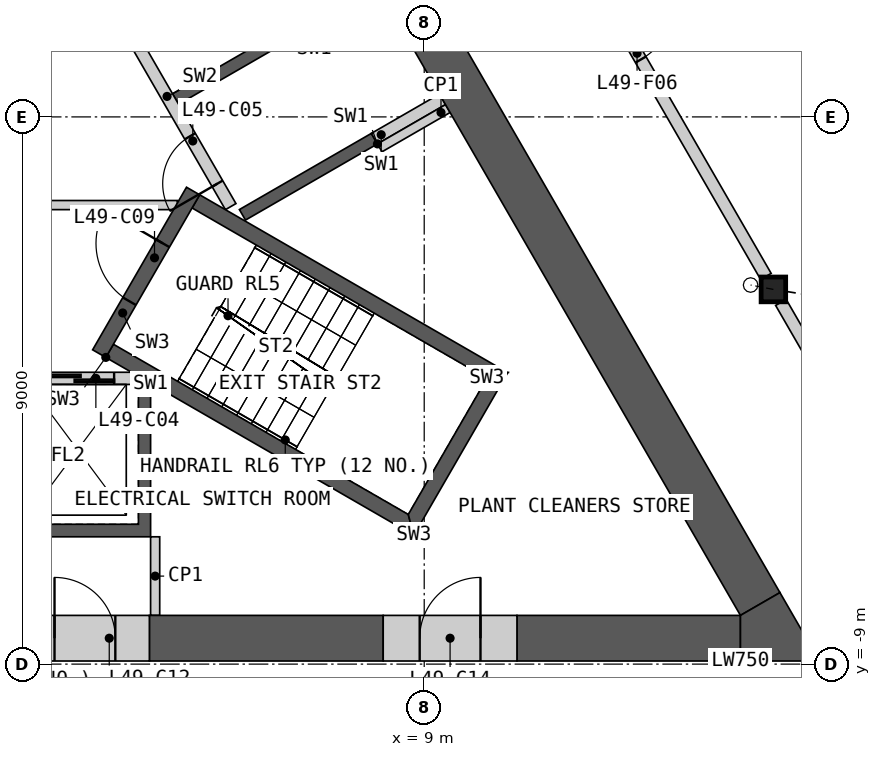
"""IFC4 building model, lengths in metres.
Left out: names, types, materials, properties, quantities, classifications, styles, units other than length and angle.
Written with IfcOpenShell. Run it as: python <this file> out.ifc"""

import sys

from ifc_helpers import new_model, si_unit, direction, frame, frame_2d, origin, origin_2d, place, context, subcontext, project, spatial, polyline, rectangle, i_section, outline, extrude, element, fill, save


model = new_model("IFC4")
c1 = context("Model", 3, precision=1e-05, world=origin(), true_north=direction((0.0, 1.0)))
c2 = subcontext(c1, "Body", "Model", "MODEL_VIEW")
j1 = project(units=[si_unit("LENGTHUNIT", "METRE"), si_unit("PLANEANGLEUNIT", "RADIAN")], contexts=[c1])
p1 = place(None, origin())
s1 = spatial("IfcSite", under=j1, at=p1, CompositionType="ELEMENT")
p2 = place(p1, origin())
s2 = spatial("IfcBuilding", under=s1, at=p2, CompositionType="ELEMENT")
p3 = place(p2, frame((0.0, 0.0, 226.0)))
s3 = spatial("IfcBuildingStorey", under=s2, at=p3, CompositionType="ELEMENT", Elevation=226.0)
p4 = place(p3, frame((14.743, -2.837, 0.0), z_axis=(-0.074782233985, 0.014362473324, 0.997096453128), x_axis=(-0.188610251533, -0.982052021543, 0.0)))
e1 = element("IfcColumn", 1, at=p4, inside=s3, PredefinedType="COLUMN", context=c2, shape_type="SweptSolid", body=[
    extrude(i_section(OverallWidth=0.404, OverallDepth=0.407, WebThickness=0.027, FlangeThickness=0.044, at=origin_2d()), frame((0.0, 0.0, 0.016)), (0.0, 0.0, 1.0), 4.983),
])
p5 = place(p3, origin())
e2 = element("IfcWall", 2, at=p5, inside=s3, PredefinedType="SHEAR", context=c2, shape_type="SweptSolid", body=[
    extrude(outline(polyline([(4.5, -4.4), (4.5, -6.906), (2.1, -6.906), (2.1, -4.4), (2.3, -4.4), (2.3, -6.7), (4.3, -6.7), (4.3, -4.4), (4.5, -4.4)])), origin(), (0.0, 0.0, 1.0), 4.65),
])
p6 = place(p3, frame((-4.187, -4.3, 0.0), z_axis=(0.0, 0.0, 1.0), x_axis=(1.0, 0.0, 0.0)))
e3 = element("IfcWall", 3, at=p6, inside=s3, PredefinedType="SOLIDWALL", context=c2, shape_type="SweptSolid", body=[
    extrude(rectangle(XDim=8.373, YDim=0.2, at=frame_2d((4.187, 0.0))), origin(), (0.0, 0.0, 1.0), 4.65),
])
p7 = place(p6, frame((0.287, 0.0, 0.0)))
e4 = element("IfcOpeningElement", 4, at=p7, cuts=e3, PredefinedType="OPENING", context=c2, shape_type="SweptSolid", body=[
    extrude(rectangle(XDim=1.2, YDim=2.1, at=frame_2d((0.6, 1.05))), frame((0.0, 0.11, 0.0), z_axis=(0.0, -1.0, 0.0), x_axis=(1.0, 0.0, 0.0)), (0.0, 0.0, 1.0), 0.22),
])
p8 = place(p6, frame((2.387, 0.0, 0.0)))
e5 = element("IfcOpeningElement", 5, at=p8, cuts=e3, PredefinedType="OPENING", context=c2, shape_type="SweptSolid", body=[
    extrude(rectangle(XDim=1.4, YDim=2.1, at=frame_2d((0.7, 1.05))), frame((0.0, 0.11, 0.0), z_axis=(0.0, -1.0, 0.0), x_axis=(1.0, 0.0, 0.0)), (0.0, 0.0, 1.0), 0.22),
])
p9 = place(p6, frame((4.837, 0.0, 0.0)))
e6 = element("IfcOpeningElement", 6, at=p9, cuts=e3, PredefinedType="OPENING", context=c2, shape_type="SweptSolid", body=[
    extrude(rectangle(XDim=0.9, YDim=2.1, at=frame_2d((0.45, 1.05))), frame((0.0, 0.11, 0.0), z_axis=(0.0, -1.0, 0.0), x_axis=(1.0, 0.0, 0.0)), (0.0, 0.0, 1.0), 0.22),
])
p10 = place(p6, frame((6.887, 0.0, 0.0)))
e7 = element("IfcOpeningElement", 7, at=p10, cuts=e3, PredefinedType="OPENING", context=c2, shape_type="SweptSolid", body=[
    extrude(rectangle(XDim=1.2, YDim=2.1, at=frame_2d((0.6, 1.05))), frame((0.0, 0.11, 0.0), z_axis=(0.0, -1.0, 0.0), x_axis=(1.0, 0.0, 0.0)), (0.0, 0.0, 1.0), 0.22),
])
p11 = place(p3, origin())
e8 = element("IfcWall", 8, at=p11, inside=s3, PredefinedType="SHEAR", context=c2, shape_type="SweptSolid", body=[
    extrude(outline(polyline([(1.561, 6.097), (3.731, 7.35), (7.131, 1.461), (4.96, 0.208), (4.861, 0.381), (6.852, 1.531), (4.752, 5.169), (2.76, 4.019), (2.66, 4.192), (4.652, 5.342), (3.652, 7.074), (1.66, 5.924), (1.561, 6.097)])), origin(), (0.0, 0.0, 1.0), 4.65),
])
p12 = place(p3, origin())
e9 = element("IfcWall", 9, at=p12, inside=s3, PredefinedType="SHEAR", context=c2, shape_type="SweptSolid", body=[
    extrude(outline(polyline([(8.231, -0.444), (6.061, -1.697), (5.96, -1.524), (8.131, -0.271), (8.231, -0.444)])), origin(), (0.0, 0.0, 1.0), 4.65),
])
p13 = place(p3, frame((5.817, -1.476, 0.0), z_axis=(0.0, 0.0, 1.0), x_axis=(-0.500002616675, 0.866023893041, 0.0)))
e10 = element("IfcWall", 10, at=p13, inside=s3, PredefinedType="SOLIDWALL", context=c2, shape_type="SweptSolid", body=[
    extrude(rectangle(XDim=8.373, YDim=0.2, at=frame_2d((4.187, 0.0))), origin(), (0.0, 0.0, 1.0), 4.65),
])
p14 = place(p13, frame((0.437, 0.0, 0.0)))
e11 = element("IfcOpeningElement", 11, at=p14, cuts=e10, PredefinedType="OPENING", context=c2, shape_type="SweptSolid", body=[
    extrude(rectangle(XDim=0.9, YDim=2.1, at=frame_2d((0.45, 1.05))), frame((0.0, 0.11, 0.0), z_axis=(0.0, -1.0, 0.0), x_axis=(1.0, 0.0, 0.0)), (0.0, 0.0, 1.0), 0.22),
])
p15 = place(p13, frame((3.737, 0.0, 0.0)))
e12 = element("IfcOpeningElement", 12, at=p15, cuts=e10, PredefinedType="OPENING", context=c2, shape_type="SweptSolid", body=[
    extrude(rectangle(XDim=0.9, YDim=2.1, at=frame_2d((0.45, 1.05))), frame((0.0, 0.11, 0.0), z_axis=(0.0, -1.0, 0.0), x_axis=(1.0, 0.0, 0.0)), (0.0, 0.0, 1.0), 0.22),
])
p16 = place(p3, frame((8.181, -0.357, 0.0), z_axis=(0.0, 0.0, 1.0), x_axis=(0.866003189247, 0.500038474733, 0.0)))
e13 = element("IfcWall", 13, at=p16, inside=s3, PredefinedType="SHEAR", context=c2, shape_type="SweptSolid", body=[
    extrude(rectangle(XDim=1.293, YDim=0.2, at=frame_2d((0.646, 0.0))), origin(), (0.0, 0.0, 1.0), 4.65),
])
p17 = place(p3, frame((-4.941, -1.45, 0.0), z_axis=(0.0, 0.0, 1.0), x_axis=(1.0, 0.0, 0.0)))
e14 = element("IfcWall", 14, at=p17, inside=s3, PredefinedType="PARTITIONING", context=c2, shape_type="SweptSolid", body=[
    extrude(rectangle(XDim=9.882, YDim=0.15, at=frame_2d((4.941, 0.0))), origin(), (0.0, 0.0, 1.0), 4.65),
])
p18 = place(p17, frame((4.391, 0.0, 0.0)))
e15 = element("IfcOpeningElement", 15, at=p18, cuts=e14, PredefinedType="OPENING", context=c2, shape_type="SweptSolid", body=[
    extrude(rectangle(XDim=1.1, YDim=2.1, at=frame_2d((0.55, 1.05))), frame((0.0, 0.085, 0.0), z_axis=(0.0, -1.0, 0.0), x_axis=(1.0, 0.0, 0.0)), (0.0, 0.0, 1.0), 0.17),
])
p19 = place(p3, origin())
e16 = element("IfcWall", 16, at=p19, inside=s3, PredefinedType="SHEAR", context=c2, shape_type="SweptSolid", body=[
    extrude(outline(polyline([(3.763, -3.956), (8.83, -6.881), (8.738, -6.539), (3.888, -3.739), (3.763, -3.956)])), origin(), (0.0, 0.0, 1.0), 4.65),
])
p20 = place(p3, origin())
e17 = element("IfcWall", 17, at=p20, inside=s3, PredefinedType="SHEAR", context=c2, shape_type="SweptSolid", body=[
    extrude(outline(polyline([(8.83, -6.881), (10.374, -4.206), (10.032, -4.298), (8.738, -6.539), (8.83, -6.881)])), origin(), (0.0, 0.0, 1.0), 4.65),
])
p21 = place(p3, origin())
e18 = element("IfcWall", 18, at=p21, inside=s3, PredefinedType="SHEAR", context=c2, shape_type="SweptSolid", body=[
    extrude(outline(polyline([(10.032, -4.298), (10.374, -4.206), (5.307, -1.281), (5.182, -1.498), (10.032, -4.298)])), origin(), (0.0, 0.0, 1.0), 4.65),
])
p22 = place(p3, frame((3.655, -3.893, 0.0), z_axis=(0.0, 0.0, 1.0), x_axis=(0.499982516597, 0.866035497597, 0.0)))
e19 = element("IfcWall", 19, at=p22, inside=s3, PredefinedType="SHEAR", context=c2, shape_type="SweptSolid", body=[
    extrude(rectangle(XDim=3.088, YDim=0.25, at=frame_2d((1.544, 0.0))), origin(), (0.0, 0.0, 1.0), 4.65),
])
p23 = place(p22, frame((0.994, 0.0, 0.0)))
e20 = element("IfcOpeningElement", 20, at=p23, cuts=e19, PredefinedType="OPENING", context=c2, shape_type="SweptSolid", body=[
    extrude(rectangle(XDim=1.1, YDim=2.1, at=frame_2d((0.55, 1.05))), frame((0.0, 0.135, 0.0), z_axis=(0.0, -1.0, 0.0), x_axis=(1.0, 0.0, 0.0)), (0.0, 0.0, 1.0), 0.27),
])
for number, where, z_axis, x_axis in (
    (21, (4.575, -6.906, 0.0), (0.0, 0.0, 1.0), (0.0, -1.0, 0.0)),
    (22, (8.268, -0.509, 0.0), (0.0, 0.0, 1.0), (0.866, 0.5, 0.0)),
):
    element("IfcWall", number, at=place(p3, frame(where, z_axis=z_axis, x_axis=x_axis)), inside=s3, PredefinedType="PARTITIONING", context=c2, shape_type="SweptSolid", body=[
        extrude(rectangle(XDim=1.293, YDim=0.15, at=frame_2d((0.646, 0.0))), origin(), (0.0, 0.0, 1.0), 4.65),
    ])
p24 = place(p3, frame((4.48, -8.574, 0.0), z_axis=(0.0, 0.0, 1.0), x_axis=(1.0, 0.0, 0.0)))
e23 = element("IfcWall", 23, at=p24, inside=s3, PredefinedType="SHEAR", context=c2, shape_type="SweptSolid", body=[
    extrude(rectangle(XDim=3.845, YDim=0.75, at=frame_2d((1.923, 0.0))), origin(), (0.0, 0.0, 1.0), 4.65),
])
p25 = place(p3, frame((10.525, -8.574, 0.0), z_axis=(0.0, 0.0, 1.0), x_axis=(1.0, 0.0, 0.0)))
e24 = element("IfcWall", 24, at=p25, inside=s3, PredefinedType="SHEAR", context=c2, shape_type="SweptSolid", body=[
    extrude(rectangle(XDim=3.676, YDim=0.75, at=frame_2d((1.838, 0.0))), origin(), (0.0, 0.0, 1.0), 4.65),
])
p26 = place(p3, frame((14.526, -8.011, 0.0), z_axis=(0.0, 0.0, 1.0), x_axis=(-0.499994855372, 0.866028374016, 0.0)))
e25 = element("IfcWall", 25, at=p26, inside=s3, PredefinedType="SHEAR", context=c2, shape_type="SweptSolid", body=[
    extrude(rectangle(XDim=14.301, YDim=0.75, at=frame_2d((7.15, 0.0))), origin(), (0.0, 0.0, 1.0), 4.65),
])
p27 = place(p3, origin())
e26 = element("IfcWall", 26, at=p27, inside=s3, PredefinedType="SHEAR", context=c2, shape_type="SweptSolid", body=[
    extrude(outline(polyline([(14.201, -8.949), (14.201, -8.199), (14.851, -7.824), (15.5, -8.949), (14.201, -8.949)])), origin(), (0.0, 0.0, 1.0), 4.65),
])
p28 = place(p3, frame((2.32, -8.574, 0.0), z_axis=(0.0, 0.0, 1.0), x_axis=(1.0, 0.0, 0.0)))
e27 = element("IfcWall", 27, at=p28, inside=s3, PredefinedType="SHEAR", context=c2, shape_type="SweptSolid", body=[
    extrude(rectangle(XDim=2.16, YDim=0.75, at=frame_2d((1.08, 0.0))), origin(), (0.0, 0.0, 1.0), 4.65),
])
p29 = place(p28, frame((0.6, 0.0, 0.0)))
e28 = element("IfcOpeningElement", 28, at=p29, cuts=e27, PredefinedType="OPENING", context=c2, shape_type="SweptSolid", body=[
    extrude(rectangle(XDim=1.0, YDim=2.1, at=frame_2d((0.5, 1.05))), frame((0.0, 0.385, 0.0), z_axis=(0.0, -1.0, 0.0), x_axis=(1.0, 0.0, 0.0)), (0.0, 0.0, 1.0), 0.77),
])
p30 = place(p3, frame((8.325, -8.574, 0.0), z_axis=(0.0, 0.0, 1.0), x_axis=(1.0, 0.0, 0.0)))
e29 = element("IfcWall", 29, at=p30, inside=s3, PredefinedType="SHEAR", context=c2, shape_type="SweptSolid", body=[
    extrude(rectangle(XDim=2.2, YDim=0.75, at=frame_2d((1.1, 0.0))), origin(), (0.0, 0.0, 1.0), 4.65),
])
p31 = place(p30, frame((0.6, 0.0, 0.0)))
e30 = element("IfcOpeningElement", 30, at=p31, cuts=e29, PredefinedType="OPENING", context=c2, shape_type="SweptSolid", body=[
    extrude(rectangle(XDim=1.0, YDim=2.1, at=frame_2d((0.5, 1.05))), frame((0.0, 0.385, 0.0), z_axis=(0.0, -1.0, 0.0), x_axis=(1.0, 0.0, 0.0)), (0.0, 0.0, 1.0), 0.77),
])
p32 = place(p3, frame((9.952, 5.461, 0.0), z_axis=(0.0, 0.0, 1.0), x_axis=(0.50000393355, -0.866023132736, 0.0)))
e31 = element("IfcWall", 31, at=p32, inside=s3, PredefinedType="PARTITIONING", context=c2, shape_type="SweptSolid", body=[
    extrude(rectangle(XDim=9.335, YDim=0.2, at=frame_2d((4.667, 0.0))), origin(), (0.0, 0.0, 1.0), 4.65),
])
p33 = place(p32, frame((4.017, 0.0, 0.0)))
e32 = element("IfcOpeningElement", 32, at=p33, cuts=e31, PredefinedType="OPENING", context=c2, shape_type="SweptSolid", body=[
    extrude(rectangle(XDim=1.2, YDim=2.1, at=frame_2d((0.6, 1.05))), frame((0.0, 0.11, 0.0), z_axis=(0.0, -1.0, 0.0), x_axis=(1.0, 0.0, 0.0)), (0.0, 0.0, 1.0), 0.22),
])
p34 = place(p3, frame((14.866, -3.051, 0.0), z_axis=(0.0, 0.0, 1.0), x_axis=(0.499975807604, -0.86603937082, 0.0)))
e33 = element("IfcWall", 33, at=p34, inside=s3, PredefinedType="PARTITIONING", context=c2, shape_type="SweptSolid", body=[
    extrude(rectangle(XDim=5.756, YDim=0.2, at=frame_2d((2.878, 0.0))), origin(), (0.0, 0.0, 1.0), 4.65),
])
p35 = place(p10, origin())
e34 = element("IfcDoor", 34, at=p35, inside=s3, OperationType="SLIDING_TO_LEFT", PredefinedType="DOOR", context=c2, shape_type="SweptSolid", body=[
    extrude(rectangle(XDim=1.2, YDim=2.1, at=frame_2d((0.6, 1.05))), frame((0.0, 0.025, 0.0), z_axis=(0.0, -1.0, 0.0), x_axis=(1.0, 0.0, 0.0)), (0.0, 0.0, 1.0), 0.05),
])
fill(e7, e34)
p36 = place(p14, origin())
e35 = element("IfcDoor", 35, at=p36, inside=s3, OperationType="SINGLE_SWING_LEFT", PredefinedType="DOOR", context=c2, shape_type="SweptSolid", body=[
    extrude(rectangle(XDim=0.9, YDim=2.1, at=frame_2d((0.45, 1.05))), frame((0.0, 0.025, 0.0), z_axis=(0.0, -1.0, 0.0), x_axis=(1.0, 0.0, 0.0)), (0.0, 0.0, 1.0), 0.05),
])
fill(e11, e35)
p37 = place(p23, origin())
e36 = element("IfcDoor", 36, at=p37, inside=s3, OperationType="SINGLE_SWING_RIGHT", PredefinedType="DOOR", context=c2, shape_type="SweptSolid", body=[
    extrude(rectangle(XDim=1.1, YDim=2.1, at=frame_2d((0.55, 1.05))), frame((0.0, 0.025, 0.0), z_axis=(0.0, -1.0, 0.0), x_axis=(1.0, 0.0, 0.0)), (0.0, 0.0, 1.0), 0.05),
])
fill(e20, e36)
p38 = place(p29, origin())
e37 = element("IfcDoor", 37, at=p38, inside=s3, OperationType="SINGLE_SWING_LEFT", PredefinedType="DOOR", context=c2, shape_type="SweptSolid", body=[
    extrude(rectangle(XDim=1.0, YDim=2.1, at=frame_2d((0.5, 1.05))), frame((0.0, 0.13, 0.0), z_axis=(0.0, -1.0, 0.0), x_axis=(1.0, 0.0, 0.0)), (0.0, 0.0, 1.0), 0.05),
])
fill(e28, e37)
p39 = place(p31, origin())
e38 = element("IfcDoor", 38, at=p39, inside=s3, OperationType="SINGLE_SWING_RIGHT", PredefinedType="DOOR", context=c2, shape_type="SweptSolid", body=[
    extrude(rectangle(XDim=1.0, YDim=2.1, at=frame_2d((0.5, 1.05))), frame((0.0, 0.13, 0.0), z_axis=(0.0, -1.0, 0.0), x_axis=(1.0, 0.0, 0.0)), (0.0, 0.0, 1.0), 0.05),
])
fill(e30, e38)
p40 = place(p33, origin())
e39 = element("IfcDoor", 39, at=p40, inside=s3, OperationType="SINGLE_SWING_LEFT", PredefinedType="DOOR", context=c2, shape_type="SweptSolid", body=[
    extrude(rectangle(XDim=1.2, YDim=2.1, at=frame_2d((0.6, 1.05))), frame((0.0, 0.025, 0.0), z_axis=(0.0, -1.0, 0.0), x_axis=(1.0, 0.0, 0.0)), (0.0, 0.0, 1.0), 0.05),
])
fill(e32, e39)
save(model, sys.argv[1])
